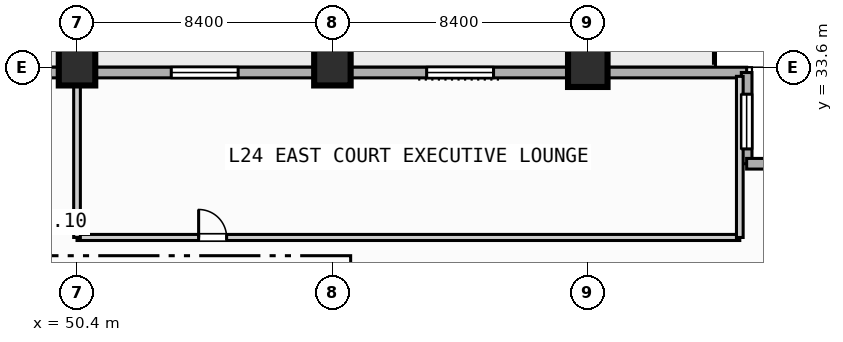
"""IFC4 building model, lengths in metres.
Left out: names, types, materials, properties, quantities, classifications, styles, units other than length and angle.
Written with IfcOpenShell. Run it as: python <this file> out.ifc"""

import sys

from ifc_helpers import new_model, si_unit, direction, frame, frame_2d, origin, origin_2d, place, context, subcontext, project, spatial, rectangle, extrude, element, fill, save


model = new_model("IFC4")
c1 = context("Model", 3, precision=1e-05, world=origin(), true_north=direction((0.0, 1.0)))
c2 = subcontext(c1, "Body", "Model", "MODEL_VIEW")
j1 = project(units=[si_unit("LENGTHUNIT", "METRE"), si_unit("PLANEANGLEUNIT", "RADIAN")], contexts=[c1])
p1 = place(None, origin())
s1 = spatial("IfcSite", under=j1, at=p1, CompositionType="ELEMENT")
p2 = place(p1, origin())
s2 = spatial("IfcBuilding", under=s1, at=p2, CompositionType="ELEMENT")
p3 = place(p2, frame((0.0, 0.0, 103.8)))
s3 = spatial("IfcBuildingStorey", under=s2, at=p3, CompositionType="ELEMENT", Elevation=103.8)
for number, where, z_axis, x_axis in (
    (1, (50.4, 33.6, 0.0), (0.0, 0.0, 1.0), (1.0, 0.0, 0.0)),
    (2, (58.8, 33.6, 0.0), (0.0, 0.0, 1.0), (1.0, 0.0, 0.0)),
):
    element("IfcColumn", number, at=place(p3, frame(where, z_axis=z_axis, x_axis=x_axis)), inside=s3, PredefinedType="COLUMN", context=c2, shape_type="SweptSolid", body=[
        extrude(rectangle(XDim=1.2, YDim=1.2, at=origin_2d()), origin(), (0.0, 0.0, 1.0), 3.8),
    ])
p4 = place(p3, frame((67.2, 33.6, 0.0), z_axis=(0.0, 0.0, 1.0), x_axis=(1.0, 0.0, 0.0)))
e3 = element("IfcColumn", 3, at=p4, inside=s3, PredefinedType="COLUMN", context=c2, shape_type="SweptSolid", body=[
    extrude(rectangle(XDim=1.3, YDim=1.3, at=origin_2d()), origin(), (0.0, 0.0, 1.0), 3.8),
])
p5 = place(p3, frame((33.425, 33.425, 0.0), z_axis=(0.0, 0.0, 1.0), x_axis=(1.0, 0.0, 0.0)))
e4 = element("IfcWall", 4, at=p5, inside=s3, PredefinedType="STANDARD", context=c2, shape_type="SweptSolid", body=[
    extrude(rectangle(XDim=39.0, YDim=0.35, at=frame_2d((19.5, 0.0))), origin(), (0.0, 0.0, 1.0), 3.55),
])
p6 = place(p5, frame((12.075, 0.0, 0.0)))
e5 = element("IfcOpeningElement", 5, at=p6, cuts=e4, PredefinedType="OPENING", context=c2, shape_type="SweptSolid", body=[
    extrude(rectangle(XDim=1.4, YDim=2.2, at=frame_2d((0.7, 1.1))), frame((0.0, 0.185, 0.0), z_axis=(0.0, -1.0, 0.0), x_axis=(1.0, 0.0, 0.0)), (0.0, 0.0, 1.0), 0.37),
])
p7 = place(p5, frame((20.075, 0.0, 0.85)))
e6 = element("IfcOpeningElement", 6, at=p7, cuts=e4, PredefinedType="OPENING", context=c2, shape_type="SweptSolid", body=[
    extrude(rectangle(XDim=2.2, YDim=1.8, at=frame_2d((1.1, 0.9))), frame((0.0, 0.185, 0.0), z_axis=(0.0, -1.0, 0.0), x_axis=(1.0, 0.0, 0.0)), (0.0, 0.0, 1.0), 0.37),
])
p8 = place(p5, frame((28.475, 0.0, 0.85)))
e7 = element("IfcOpeningElement", 7, at=p8, cuts=e4, PredefinedType="OPENING", context=c2, shape_type="SweptSolid", body=[
    extrude(rectangle(XDim=2.2, YDim=1.8, at=frame_2d((1.1, 0.9))), frame((0.0, 0.185, 0.0), z_axis=(0.0, -1.0, 0.0), x_axis=(1.0, 0.0, 0.0)), (0.0, 0.0, 1.0), 0.37),
])
p9 = place(p3, frame((72.425, 33.425, 0.0), z_axis=(0.0, 0.0, 1.0), x_axis=(0.0, -1.0, 0.0)))
e8 = element("IfcWall", 8, at=p9, inside=s3, PredefinedType="STANDARD", context=c2, shape_type="SweptSolid", body=[
    extrude(rectangle(XDim=3.0, YDim=0.35, at=frame_2d((1.5, 0.0))), origin(), (0.0, 0.0, 1.0), 3.55),
])
p10 = place(p9, frame((0.712, 0.0, 0.85)))
e9 = element("IfcOpeningElement", 9, at=p10, cuts=e8, PredefinedType="OPENING", context=c2, shape_type="SweptSolid", body=[
    extrude(rectangle(XDim=1.8, YDim=1.8, at=frame_2d((0.9, 0.9))), frame((0.0, 0.185, 0.0), z_axis=(0.0, -1.0, 0.0), x_axis=(1.0, 0.0, 0.0)), (0.0, 0.0, 1.0), 0.37),
])
p11 = place(p3, frame((72.425, 30.425, 0.0), z_axis=(0.0, 0.0, 1.0), x_axis=(1.0, 0.0, 0.0)))
e10 = element("IfcWall", 10, at=p11, inside=s3, PredefinedType="STANDARD", context=c2, shape_type="SweptSolid", body=[
    extrude(rectangle(XDim=3.0, YDim=0.35, at=frame_2d((1.5, 0.0))), origin(), (0.0, 0.0, 1.0), 3.55),
])
p12 = place(p3, frame((50.4, 28.0, 0.0), z_axis=(0.0, 0.0, 1.0), x_axis=(1.0, 0.0, 0.0)))
e11 = element("IfcWall", 11, at=p12, inside=s3, PredefinedType="PARTITIONING", context=c2, shape_type="SweptSolid", body=[
    extrude(rectangle(XDim=21.8, YDim=0.2, at=frame_2d((10.9, 0.0))), origin(), (0.0, 0.0, 1.0), 3.55),
])
p13 = place(p12, frame((4.0, 0.0, 0.0)))
e12 = element("IfcOpeningElement", 12, at=p13, cuts=e11, PredefinedType="OPENING", context=c2, shape_type="SweptSolid", body=[
    extrude(rectangle(XDim=0.92, YDim=2.1, at=frame_2d((0.46, 1.05))), frame((0.0, 0.11, 0.0), z_axis=(0.0, -1.0, 0.0), x_axis=(1.0, 0.0, 0.0)), (0.0, 0.0, 1.0), 0.22),
])
p14 = place(p3, frame((50.4, 28.0, 0.0), z_axis=(0.0, 0.0, 1.0), x_axis=(0.0, 1.0, 0.0)))
e13 = element("IfcWall", 13, at=p14, inside=s3, PredefinedType="PARTITIONING", context=c2, shape_type="SweptSolid", body=[
    extrude(rectangle(XDim=5.3, YDim=0.22, at=frame_2d((2.65, 0.0))), origin(), (0.0, 0.0, 1.0), 2.8),
])
p15 = place(p3, frame((72.2, 28.0, 0.0), z_axis=(0.0, 0.0, 1.0), x_axis=(0.0, 1.0, 0.0)))
e14 = element("IfcWall", 14, at=p15, inside=s3, PredefinedType="PARTITIONING", context=c2, shape_type="SweptSolid", body=[
    extrude(rectangle(XDim=5.3, YDim=0.22, at=frame_2d((2.65, 0.0))), origin(), (0.0, 0.0, 1.0), 3.55),
])
p16 = place(p7, origin())
e15 = element("IfcWindow", 15, at=p16, inside=s3, PartitioningType="SINGLE_PANEL", PredefinedType="WINDOW", context=c2, shape_type="SweptSolid", body=[
    extrude(rectangle(XDim=2.2, YDim=1.8, at=frame_2d((1.1, 0.9))), frame((0.0, 0.03, 0.0), z_axis=(0.0, -1.0, 0.0), x_axis=(1.0, 0.0, 0.0)), (0.0, 0.0, 1.0), 0.06),
])
fill(e6, e15)
p17 = place(p8, origin())
e16 = element("IfcWindow", 16, at=p17, inside=s3, PartitioningType="SINGLE_PANEL", PredefinedType="WINDOW", context=c2, shape_type="SweptSolid", body=[
    extrude(rectangle(XDim=2.2, YDim=1.8, at=frame_2d((1.1, 0.9))), frame((0.0, 0.03, 0.0), z_axis=(0.0, -1.0, 0.0), x_axis=(1.0, 0.0, 0.0)), (0.0, 0.0, 1.0), 0.06),
])
fill(e7, e16)
p18 = place(p10, origin())
e17 = element("IfcWindow", 17, at=p18, inside=s3, PartitioningType="SINGLE_PANEL", PredefinedType="WINDOW", context=c2, shape_type="SweptSolid", body=[
    extrude(rectangle(XDim=1.8, YDim=1.8, at=frame_2d((0.9, 0.9))), frame((0.0, 0.03, 0.0), z_axis=(0.0, -1.0, 0.0), x_axis=(1.0, 0.0, 0.0)), (0.0, 0.0, 1.0), 0.06),
])
fill(e9, e17)
p19 = place(p13, origin())
e18 = element("IfcDoor", 18, at=p19, inside=s3, OperationType="SINGLE_SWING_LEFT", PredefinedType="DOOR", context=c2, shape_type="SweptSolid", body=[
    extrude(rectangle(XDim=0.92, YDim=2.1, at=frame_2d((0.46, 1.05))), frame((0.0, 0.025, 0.0), z_axis=(0.0, -1.0, 0.0), x_axis=(1.0, 0.0, 0.0)), (0.0, 0.0, 1.0), 0.05),
])
fill(e12, e18)
save(model, sys.argv[1])
